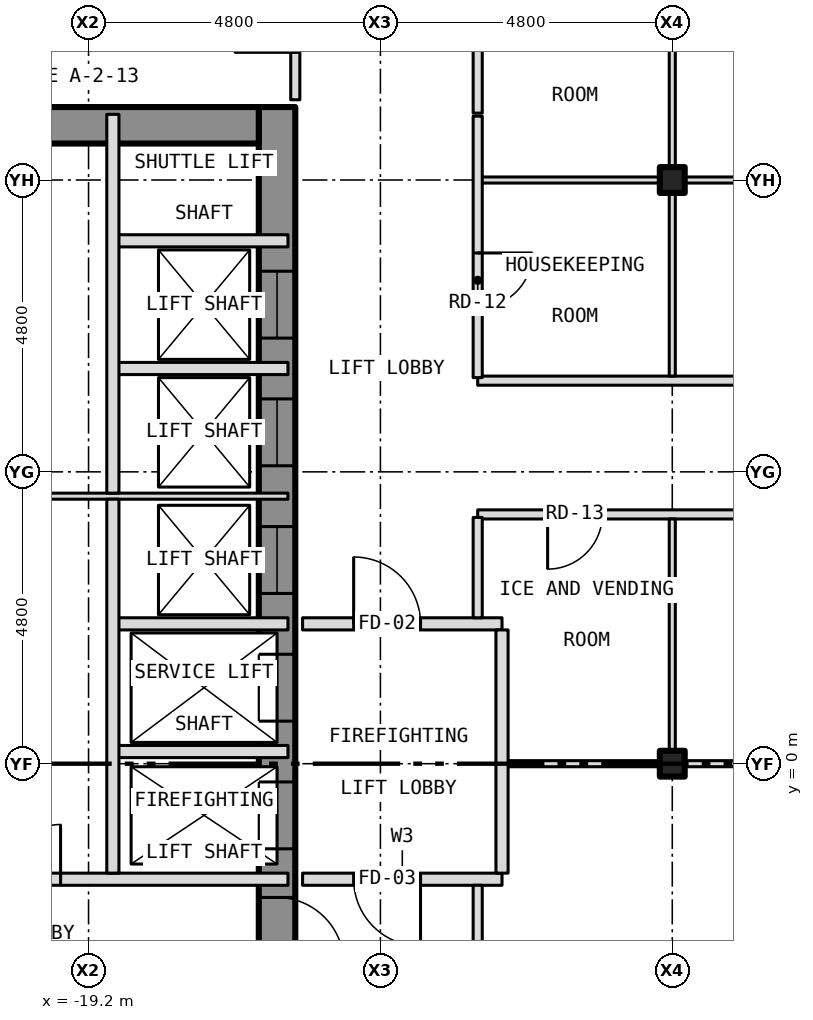
"""IFC4 building model, lengths in metres.
Left out: names, types, materials, properties, quantities, classifications, styles, units other than length and angle.
Written with IfcOpenShell. Run it as: python <this file> out.ifc"""

import sys

from ifc_helpers import new_model, si_unit, direction, frame, frame_2d, origin, origin_2d, place, context, subcontext, project, spatial, rectangle, i_section, extrude, element, fill, save


model = new_model("IFC4")
c1 = context("Model", 3, precision=1e-05, world=origin(), true_north=direction((0.0, 1.0)))
c2 = subcontext(c1, "Body", "Model", "MODEL_VIEW")
j1 = project(units=[si_unit("LENGTHUNIT", "METRE"), si_unit("PLANEANGLEUNIT", "RADIAN")], contexts=[c1])
p1 = place(None, origin())
s1 = spatial("IfcSite", under=j1, at=p1, CompositionType="ELEMENT")
p2 = place(p1, origin())
s2 = spatial("IfcBuilding", under=s1, at=p2, CompositionType="ELEMENT")
p3 = place(p2, frame((0.0, 0.0, 49.5)))
s3 = spatial("IfcBuildingStorey", under=s2, at=p3, CompositionType="ELEMENT", Elevation=49.5)
for number, where, z_axis, x_axis in (
    (1, (-9.6, 0.0, -0.15), (0.0, 0.0, 1.0), (1.0, 0.0, 0.0)),
    (2, (-9.6, 9.6, -0.15), (0.0, 0.0, 1.0), (1.0, 0.0, 0.0)),
):
    element("IfcColumn", number, at=place(p3, frame(where, z_axis=z_axis, x_axis=x_axis)), inside=s3, PredefinedType="COLUMN", context=c2, shape_type="SweptSolid", body=[
        extrude(i_section(OverallWidth=0.409, OverallDepth=0.424, WebThickness=0.033, FlangeThickness=0.052, at=origin_2d()), origin(), (0.0, 0.0, 1.0), 3.5),
    ])
p4 = place(p3, frame((-16.1, -10.8, 0.0), z_axis=(0.0, 0.0, 1.0), x_axis=(0.0, 1.0, 0.0)))
e3 = element("IfcWall", 3, at=p4, inside=s3, PredefinedType="SHEAR", context=c2, shape_type="SweptSolid", body=[
    extrude(rectangle(XDim=21.6, YDim=0.6, at=frame_2d((10.8, 0.0))), origin(), (0.0, 0.0, 1.0), 3.25),
])
p5 = place(p4, frame((9.4, 0.0, 0.0)))
e4 = element("IfcOpeningElement", 4, at=p5, cuts=e3, PredefinedType="OPENING", context=c2, shape_type="SweptSolid", body=[
    extrude(rectangle(XDim=1.1, YDim=2.1, at=frame_2d((0.55, 1.05))), frame((0.0, 0.312, 0.0), z_axis=(0.0, -1.0, 0.0), x_axis=(1.0, 0.0, 0.0)), (0.0, 0.0, 1.0), 0.624),
])
p6 = place(p4, frame((11.5, 0.0, 0.0)))
e5 = element("IfcOpeningElement", 5, at=p6, cuts=e3, PredefinedType="OPENING", context=c2, shape_type="SweptSolid", body=[
    extrude(rectangle(XDim=1.1, YDim=2.1, at=frame_2d((0.55, 1.05))), frame((0.0, 0.312, 0.0), z_axis=(0.0, -1.0, 0.0), x_axis=(1.0, 0.0, 0.0)), (0.0, 0.0, 1.0), 0.624),
])
p7 = place(p4, frame((13.6, 0.0, 0.0)))
e6 = element("IfcOpeningElement", 6, at=p7, cuts=e3, PredefinedType="OPENING", context=c2, shape_type="SweptSolid", body=[
    extrude(rectangle(XDim=1.1, YDim=2.1, at=frame_2d((0.55, 1.05))), frame((0.0, 0.312, 0.0), z_axis=(0.0, -1.0, 0.0), x_axis=(1.0, 0.0, 0.0)), (0.0, 0.0, 1.0), 0.624),
])
p8 = place(p4, frame((15.7, 0.0, 0.0)))
e7 = element("IfcOpeningElement", 7, at=p8, cuts=e3, PredefinedType="OPENING", context=c2, shape_type="SweptSolid", body=[
    extrude(rectangle(XDim=1.1, YDim=2.1, at=frame_2d((0.55, 1.05))), frame((0.0, 0.312, 0.0), z_axis=(0.0, -1.0, 0.0), x_axis=(1.0, 0.0, 0.0)), (0.0, 0.0, 1.0), 0.624),
])
p9 = place(p4, frame((17.8, 0.0, 0.0)))
e8 = element("IfcOpeningElement", 8, at=p9, cuts=e3, PredefinedType="OPENING", context=c2, shape_type="SweptSolid", body=[
    extrude(rectangle(XDim=1.1, YDim=2.1, at=frame_2d((0.55, 1.05))), frame((0.0, 0.312, 0.0), z_axis=(0.0, -1.0, 0.0), x_axis=(1.0, 0.0, 0.0)), (0.0, 0.0, 1.0), 0.624),
])
p10 = place(p4, frame((0.758, 0.0, 0.0)))
e9 = element("IfcOpeningElement", 9, at=p10, cuts=e3, PredefinedType="OPENING", context=c2, shape_type="SweptSolid", body=[
    extrude(rectangle(XDim=1.1, YDim=2.1, at=frame_2d((0.55, 1.05))), frame((0.0, 0.312, 0.0), z_axis=(0.0, -1.0, 0.0), x_axis=(1.0, 0.0, 0.0)), (0.0, 0.0, 1.0), 0.624),
])
p11 = place(p4, frame((7.5, 0.0, 0.0)))
e10 = element("IfcOpeningElement", 10, at=p11, cuts=e3, PredefinedType="OPENING", context=c2, shape_type="SweptSolid", body=[
    extrude(rectangle(XDim=1.1, YDim=2.1, at=frame_2d((0.55, 1.05))), frame((0.0, 0.312, 0.0), z_axis=(0.0, -1.0, 0.0), x_axis=(1.0, 0.0, 0.0)), (0.0, 0.0, 1.0), 0.624),
])
p12 = place(p3, frame((-23.4, 10.5, 0.0), z_axis=(0.0, 0.0, 1.0), x_axis=(1.0, 0.0, 0.0)))
e11 = element("IfcWall", 11, at=p12, inside=s3, PredefinedType="SHEAR", context=c2, shape_type="SweptSolid", body=[
    extrude(rectangle(XDim=7.0, YDim=0.6, at=frame_2d((3.5, 0.0))), origin(), (0.0, 0.0, 1.0), 3.25),
])
p13 = place(p3, frame((-23.88, -1.9, 0.0), z_axis=(0.0, 0.0, 1.0), x_axis=(1.0, 0.0, 0.0)))
e12 = element("IfcWall", 12, at=p13, inside=s3, PredefinedType="PARTITIONING", context=c2, shape_type="SweptSolid", body=[
    extrude(rectangle(XDim=7.96, YDim=0.2, at=frame_2d((3.98, 0.0))), origin(), (0.0, 0.0, 1.0), 3.25),
])
p14 = place(p13, frame((3.32, 0.0, 0.0)))
e13 = element("IfcOpeningElement", 13, at=p14, cuts=e12, PredefinedType="OPENING", context=c2, shape_type="SweptSolid", body=[
    extrude(rectangle(XDim=0.9, YDim=2.1, at=frame_2d((0.45, 1.05))), frame((0.0, 0.112, 0.0), z_axis=(0.0, -1.0, 0.0), x_axis=(1.0, 0.0, 0.0)), (0.0, 0.0, 1.0), 0.224),
])
p15 = place(p3, frame((-15.68, -1.9, 0.0), z_axis=(0.0, 0.0, 1.0), x_axis=(1.0, 0.0, 0.0)))
e14 = element("IfcWall", 14, at=p15, inside=s3, PredefinedType="PARTITIONING", context=c2, shape_type="SweptSolid", body=[
    extrude(rectangle(XDim=3.28, YDim=0.2, at=frame_2d((1.64, 0.0))), origin(), (0.0, 0.0, 1.0), 3.35),
])
p16 = place(p15, frame((0.84, 0.0, 0.0)))
e15 = element("IfcOpeningElement", 15, at=p16, cuts=e14, PredefinedType="OPENING", context=c2, shape_type="SweptSolid", body=[
    extrude(rectangle(XDim=1.1, YDim=2.1, at=frame_2d((0.55, 1.05))), frame((0.0, 0.112, 0.0), z_axis=(0.0, -1.0, 0.0), x_axis=(1.0, 0.0, 0.0)), (0.0, 0.0, 1.0), 0.224),
])
p17 = place(p3, frame((-12.4, 0.0, 0.0), z_axis=(0.0, 0.0, 1.0), x_axis=(1.0, 0.0, 0.0)))
e16 = element("IfcWall", 16, at=p17, inside=s3, PredefinedType="PARTITIONING", context=c2, shape_type="SweptSolid", body=[
    extrude(rectangle(XDim=2.596, YDim=0.1, at=frame_2d((1.298, 0.0))), origin(), (0.0, 0.0, 1.0), 2.728),
])
p18 = place(p3, frame((-9.804, 0.0, 0.0), z_axis=(0.0, 0.0, 1.0), x_axis=(1.0, 0.0, 0.0)))
e17 = element("IfcWall", 17, at=p18, inside=s3, PredefinedType="PARTITIONING", context=c2, shape_type="SweptSolid", body=[
    extrude(rectangle(XDim=0.408, YDim=0.1, at=frame_2d((0.204, 0.0))), origin(), (0.0, 0.0, 1.0), 3.35),
])
p19 = place(p3, frame((-9.396, 0.0, 0.0), z_axis=(0.0, 0.0, 1.0), x_axis=(1.0, 0.0, 0.0)))
e18 = element("IfcWall", 18, at=p19, inside=s3, PredefinedType="PARTITIONING", context=c2, shape_type="SweptSolid", body=[
    extrude(rectangle(XDim=9.192, YDim=0.1, at=frame_2d((4.596, 0.0))), origin(), (0.0, 0.0, 1.0), 2.728),
])
for number, where, z_axis, x_axis in (
    (19, (-18.8, 0.2, 0.0), (0.0, 0.0, 1.0), (1.0, 0.0, 0.0)),
    (20, (-18.8, 2.3, 0.0), (0.0, 0.0, 1.0), (1.0, 0.0, 0.0)),
):
    element("IfcWall", number, at=place(p3, frame(where, z_axis=z_axis, x_axis=x_axis)), inside=s3, PredefinedType="PARTITIONING", context=c2, shape_type="SweptSolid", body=[
        extrude(rectangle(XDim=2.88, YDim=0.2, at=frame_2d((1.44, 0.0))), origin(), (0.0, 0.0, 1.0), 3.25),
    ])
p20 = place(p3, frame((-15.68, 2.3, 0.0), z_axis=(0.0, 0.0, 1.0), x_axis=(1.0, 0.0, 0.0)))
e21 = element("IfcWall", 21, at=p20, inside=s3, PredefinedType="PARTITIONING", context=c2, shape_type="SweptSolid", body=[
    extrude(rectangle(XDim=3.28, YDim=0.2, at=frame_2d((1.64, 0.0))), origin(), (0.0, 0.0, 1.0), 3.35),
])
p21 = place(p20, frame((0.84, 0.0, 0.0)))
e22 = element("IfcOpeningElement", 22, at=p21, cuts=e21, PredefinedType="OPENING", context=c2, shape_type="SweptSolid", body=[
    extrude(rectangle(XDim=1.1, YDim=2.1, at=frame_2d((0.55, 1.05))), frame((0.0, 0.112, 0.0), z_axis=(0.0, -1.0, 0.0), x_axis=(1.0, 0.0, 0.0)), (0.0, 0.0, 1.0), 0.224),
])
p22 = place(p3, frame((-12.8, 4.1, 0.0), z_axis=(0.0, 0.0, 1.0), x_axis=(1.0, 0.0, 0.0)))
e23 = element("IfcWall", 23, at=p22, inside=s3, PredefinedType="PARTITIONING", context=c2, shape_type="SweptSolid", body=[
    extrude(rectangle(XDim=16.9, YDim=0.15, at=frame_2d((8.45, 0.0))), origin(), (0.0, 0.0, 1.0), 3.35),
])
p23 = place(p22, frame((1.15, 0.0, 0.0)))
e24 = element("IfcOpeningElement", 24, at=p23, cuts=e23, PredefinedType="OPENING", context=c2, shape_type="SweptSolid", body=[
    extrude(rectangle(XDim=0.9, YDim=2.1, at=frame_2d((0.45, 1.05))), frame((0.0, 0.087, 0.0), z_axis=(0.0, -1.0, 0.0), x_axis=(1.0, 0.0, 0.0)), (0.0, 0.0, 1.0), 0.174),
])
p24 = place(p22, frame((14.4, 0.0, 0.0)))
e25 = element("IfcOpeningElement", 25, at=p24, cuts=e23, PredefinedType="OPENING", context=c2, shape_type="SweptSolid", body=[
    extrude(rectangle(XDim=0.9, YDim=2.1, at=frame_2d((0.45, 1.05))), frame((0.0, 0.087, 0.0), z_axis=(0.0, -1.0, 0.0), x_axis=(1.0, 0.0, 0.0)), (0.0, 0.0, 1.0), 0.174),
])
p25 = place(p22, frame((7.55, 0.0, 0.0)))
e26 = element("IfcOpeningElement", 26, at=p25, cuts=e23, PredefinedType="OPENING", context=c2, shape_type="SweptSolid", body=[
    extrude(rectangle(XDim=0.9, YDim=2.1, at=frame_2d((0.45, 1.05))), frame((0.0, 0.087, 0.0), z_axis=(0.0, -1.0, 0.0), x_axis=(1.0, 0.0, 0.0)), (0.0, 0.0, 1.0), 0.174),
])
p26 = place(p3, frame((-23.88, 4.4, 0.0), z_axis=(0.0, 0.0, 1.0), x_axis=(1.0, 0.0, 0.0)))
e27 = element("IfcWall", 27, at=p26, inside=s3, PredefinedType="PARTITIONING", context=c2, shape_type="SweptSolid", body=[
    extrude(rectangle(XDim=7.96, YDim=0.1, at=frame_2d((3.98, 0.0))), origin(), (0.0, 0.0, 1.0), 3.25),
])
p27 = place(p26, frame((2.03, 0.0, 0.0)))
e28 = element("IfcOpeningElement", 28, at=p27, cuts=e27, PredefinedType="OPENING", context=c2, shape_type="SweptSolid", body=[
    extrude(rectangle(XDim=0.9, YDim=2.1, at=frame_2d((0.45, 1.05))), frame((0.0, 0.062, 0.0), z_axis=(0.0, -1.0, 0.0), x_axis=(1.0, 0.0, 0.0)), (0.0, 0.0, 1.0), 0.124),
])
p28 = place(p3, frame((-12.8, 6.3, 0.0), z_axis=(0.0, 0.0, 1.0), x_axis=(1.0, 0.0, 0.0)))
e29 = element("IfcWall", 29, at=p28, inside=s3, PredefinedType="PARTITIONING", context=c2, shape_type="SweptSolid", body=[
    extrude(rectangle(XDim=16.9, YDim=0.15, at=frame_2d((8.45, 0.0))), origin(), (0.0, 0.0, 1.0), 3.35),
])
p29 = place(p28, frame((14.4, 0.0, 0.0)))
e30 = element("IfcOpeningElement", 30, at=p29, cuts=e29, PredefinedType="OPENING", context=c2, shape_type="SweptSolid", body=[
    extrude(rectangle(XDim=0.9, YDim=2.1, at=frame_2d((0.45, 1.05))), frame((0.0, 0.087, 0.0), z_axis=(0.0, -1.0, 0.0), x_axis=(1.0, 0.0, 0.0)), (0.0, 0.0, 1.0), 0.174),
])
p30 = place(p28, frame((7.55, 0.0, 0.0)))
e31 = element("IfcOpeningElement", 31, at=p30, cuts=e29, PredefinedType="OPENING", context=c2, shape_type="SweptSolid", body=[
    extrude(rectangle(XDim=0.9, YDim=2.1, at=frame_2d((0.45, 1.05))), frame((0.0, 0.087, 0.0), z_axis=(0.0, -1.0, 0.0), x_axis=(1.0, 0.0, 0.0)), (0.0, 0.0, 1.0), 0.174),
])
for number, where, z_axis, x_axis in (
    (32, (-18.8, 6.5, 0.0), (0.0, 0.0, 1.0), (1.0, 0.0, 0.0)),
    (33, (-18.8, 8.6, 0.0), (0.0, 0.0, 1.0), (1.0, 0.0, 0.0)),
):
    element("IfcWall", number, at=place(p3, frame(where, z_axis=z_axis, x_axis=x_axis)), inside=s3, PredefinedType="PARTITIONING", context=c2, shape_type="SweptSolid", body=[
        extrude(rectangle(XDim=2.88, YDim=0.2, at=frame_2d((1.44, 0.0))), origin(), (0.0, 0.0, 1.0), 3.25),
    ])
p31 = place(p3, frame((-12.8, 9.6, 0.0), z_axis=(0.0, 0.0, 1.0), x_axis=(1.0, 0.0, 0.0)))
e34 = element("IfcWall", 34, at=p31, inside=s3, PredefinedType="PARTITIONING", context=c2, shape_type="SweptSolid", body=[
    extrude(rectangle(XDim=2.996, YDim=0.1, at=frame_2d((1.498, 0.0))), origin(), (0.0, 0.0, 1.0), 2.728),
])
p32 = place(p3, frame((-9.804, 9.6, 0.0), z_axis=(0.0, 0.0, 1.0), x_axis=(1.0, 0.0, 0.0)))
e35 = element("IfcWall", 35, at=p32, inside=s3, PredefinedType="PARTITIONING", context=c2, shape_type="SweptSolid", body=[
    extrude(rectangle(XDim=0.408, YDim=0.1, at=frame_2d((0.204, 0.0))), origin(), (0.0, 0.0, 1.0), 3.35),
])
p33 = place(p3, frame((-9.396, 9.6, 0.0), z_axis=(0.0, 0.0, 1.0), x_axis=(1.0, 0.0, 0.0)))
e36 = element("IfcWall", 36, at=p33, inside=s3, PredefinedType="PARTITIONING", context=c2, shape_type="SweptSolid", body=[
    extrude(rectangle(XDim=9.192, YDim=0.1, at=frame_2d((4.596, 0.0))), origin(), (0.0, 0.0, 1.0), 2.728),
])
p34 = place(p3, frame((-18.8, -1.8, 0.0), z_axis=(0.0, 0.0, 1.0), x_axis=(0.0, 1.0, 0.0)))
e37 = element("IfcWall", 37, at=p34, inside=s3, PredefinedType="PARTITIONING", context=c2, shape_type="SweptSolid", body=[
    extrude(rectangle(XDim=6.15, YDim=0.2, at=frame_2d((3.075, 0.0))), origin(), (0.0, 0.0, 1.0), 3.25),
])
p35 = place(p3, frame((-18.8, 4.45, 0.0), z_axis=(0.0, 0.0, 1.0), x_axis=(0.0, 1.0, 0.0)))
e38 = element("IfcWall", 38, at=p35, inside=s3, PredefinedType="PARTITIONING", context=c2, shape_type="SweptSolid", body=[
    extrude(rectangle(XDim=6.23, YDim=0.2, at=frame_2d((3.115, 0.0))), origin(), (0.0, 0.0, 1.0), 3.25),
])
p36 = place(p3, frame((-15.8, 10.92, 0.0), z_axis=(0.0, 0.0, 1.0), x_axis=(0.0, 1.0, 0.0)))
e39 = element("IfcWall", 39, at=p36, inside=s3, PredefinedType="PARTITIONING", context=c2, shape_type="SweptSolid", body=[
    extrude(rectangle(XDim=4.805, YDim=0.15, at=frame_2d((2.403, 0.0))), origin(), (0.0, 0.0, 1.0), 3.35),
])
p37 = place(p36, frame((0.78, 0.0, 0.0)))
e40 = element("IfcOpeningElement", 40, at=p37, cuts=e39, PredefinedType="OPENING", context=c2, shape_type="SweptSolid", body=[
    extrude(rectangle(XDim=1.0, YDim=2.1, at=frame_2d((0.5, 1.05))), frame((0.0, 0.087, 0.0), z_axis=(0.0, -1.0, 0.0), x_axis=(1.0, 0.0, 0.0)), (0.0, 0.0, 1.0), 0.174),
])
p38 = place(p3, frame((-12.8, -13.525, 0.0), z_axis=(0.0, 0.0, 1.0), x_axis=(0.0, 1.0, 0.0)))
e41 = element("IfcWall", 41, at=p38, inside=s3, PredefinedType="PARTITIONING", context=c2, shape_type="SweptSolid", body=[
    extrude(rectangle(XDim=11.525, YDim=0.15, at=frame_2d((5.762, 0.0))), origin(), (0.0, 0.0, 1.0), 3.35),
])
p39 = place(p38, frame((7.325, 0.0, 0.0)))
e42 = element("IfcOpeningElement", 42, at=p39, cuts=e41, PredefinedType="OPENING", context=c2, shape_type="SweptSolid", body=[
    extrude(rectangle(XDim=0.9, YDim=2.1, at=frame_2d((0.45, 1.05))), frame((0.0, 0.087, 0.0), z_axis=(0.0, -1.0, 0.0), x_axis=(1.0, 0.0, 0.0)), (0.0, 0.0, 1.0), 0.174),
])
p40 = place(p3, frame((-12.8, 2.4, 0.0), z_axis=(0.0, 0.0, 1.0), x_axis=(0.0, 1.0, 0.0)))
e43 = element("IfcWall", 43, at=p40, inside=s3, PredefinedType="PARTITIONING", context=c2, shape_type="SweptSolid", body=[
    extrude(rectangle(XDim=1.65, YDim=0.15, at=frame_2d((0.825, 0.0))), origin(), (0.0, 0.0, 1.0), 3.35),
])
p41 = place(p3, frame((-12.8, 6.35, 0.0), z_axis=(0.0, 0.0, 1.0), x_axis=(0.0, 1.0, 0.0)))
e44 = element("IfcWall", 44, at=p41, inside=s3, PredefinedType="PARTITIONING", context=c2, shape_type="SweptSolid", body=[
    extrude(rectangle(XDim=4.3, YDim=0.15, at=frame_2d((2.15, 0.0))), origin(), (0.0, 0.0, 1.0), 3.35),
])
p42 = place(p41, frame((1.15, 0.0, 0.0)))
e45 = element("IfcOpeningElement", 45, at=p42, cuts=e44, PredefinedType="OPENING", context=c2, shape_type="SweptSolid", body=[
    extrude(rectangle(XDim=0.9, YDim=2.1, at=frame_2d((0.45, 1.05))), frame((0.0, 0.087, 0.0), z_axis=(0.0, -1.0, 0.0), x_axis=(1.0, 0.0, 0.0)), (0.0, 0.0, 1.0), 0.174),
])
p43 = place(p3, frame((-12.8, 10.7, 0.0), z_axis=(0.0, 0.0, 1.0), x_axis=(0.0, 1.0, 0.0)))
e46 = element("IfcWall", 46, at=p43, inside=s3, PredefinedType="PARTITIONING", context=c2, shape_type="SweptSolid", body=[
    extrude(rectangle(XDim=2.825, YDim=0.15, at=frame_2d((1.413, 0.0))), origin(), (0.0, 0.0, 1.0), 3.35),
])
p44 = place(p3, frame((-12.4, -1.8, 0.0), z_axis=(0.0, 0.0, 1.0), x_axis=(0.0, 1.0, 0.0)))
e47 = element("IfcWall", 47, at=p44, inside=s3, PredefinedType="PARTITIONING", context=c2, shape_type="SweptSolid", body=[
    extrude(rectangle(XDim=4.0, YDim=0.2, at=frame_2d((2.0, 0.0))), origin(), (0.0, 0.0, 1.0), 3.35),
])
p45 = place(p3, frame((-9.6, 0.05, 0.0), z_axis=(0.0, 0.0, 1.0), x_axis=(0.0, 1.0, 0.0)))
e48 = element("IfcWall", 48, at=p45, inside=s3, PredefinedType="PARTITIONING", context=c2, shape_type="SweptSolid", body=[
    extrude(rectangle(XDim=3.975, YDim=0.1, at=frame_2d((1.987, 0.0))), origin(), (0.0, 0.0, 1.0), 2.728),
])
p46 = place(p3, frame((-9.6, 6.375, 0.0), z_axis=(0.0, 0.0, 1.0), x_axis=(0.0, 1.0, 0.0)))
e49 = element("IfcWall", 49, at=p46, inside=s3, PredefinedType="PARTITIONING", context=c2, shape_type="SweptSolid", body=[
    extrude(rectangle(XDim=3.175, YDim=0.1, at=frame_2d((1.587, 0.0))), origin(), (0.0, 0.0, 1.0), 2.728),
])
p47 = place(p3, frame((-9.6, 9.65, 0.0), z_axis=(0.0, 0.0, 1.0), x_axis=(0.0, 1.0, 0.0)))
e50 = element("IfcWall", 50, at=p47, inside=s3, PredefinedType="PARTITIONING", context=c2, shape_type="SweptSolid", body=[
    extrude(rectangle(XDim=3.875, YDim=0.1, at=frame_2d((1.938, 0.0))), origin(), (0.0, 0.0, 1.0), 2.728),
])
p48 = place(p5, origin())
e51 = element("IfcDoor", 51, at=p48, inside=s3, OperationType="SLIDING_TO_LEFT", PredefinedType="DOOR", context=c2, shape_type="SweptSolid", body=[
    extrude(rectangle(XDim=1.1, YDim=2.1, at=frame_2d((0.55, 1.05))), frame((0.0, 0.025, 0.0), z_axis=(0.0, -1.0, 0.0), x_axis=(1.0, 0.0, 0.0)), (0.0, 0.0, 1.0), 0.05),
])
fill(e4, e51)
p49 = place(p6, origin())
e52 = element("IfcDoor", 52, at=p49, inside=s3, OperationType="SLIDING_TO_LEFT", PredefinedType="DOOR", context=c2, shape_type="SweptSolid", body=[
    extrude(rectangle(XDim=1.1, YDim=2.1, at=frame_2d((0.55, 1.05))), frame((0.0, 0.025, 0.0), z_axis=(0.0, -1.0, 0.0), x_axis=(1.0, 0.0, 0.0)), (0.0, 0.0, 1.0), 0.05),
])
fill(e5, e52)
p50 = place(p7, origin())
e53 = element("IfcDoor", 53, at=p50, inside=s3, OperationType="SLIDING_TO_LEFT", PredefinedType="DOOR", context=c2, shape_type="SweptSolid", body=[
    extrude(rectangle(XDim=1.1, YDim=2.1, at=frame_2d((0.55, 1.05))), frame((0.0, 0.025, 0.0), z_axis=(0.0, -1.0, 0.0), x_axis=(1.0, 0.0, 0.0)), (0.0, 0.0, 1.0), 0.05),
])
fill(e6, e53)
p51 = place(p8, origin())
e54 = element("IfcDoor", 54, at=p51, inside=s3, OperationType="SLIDING_TO_LEFT", PredefinedType="DOOR", context=c2, shape_type="SweptSolid", body=[
    extrude(rectangle(XDim=1.1, YDim=2.1, at=frame_2d((0.55, 1.05))), frame((0.0, 0.025, 0.0), z_axis=(0.0, -1.0, 0.0), x_axis=(1.0, 0.0, 0.0)), (0.0, 0.0, 1.0), 0.05),
])
fill(e7, e54)
p52 = place(p9, origin())
e55 = element("IfcDoor", 55, at=p52, inside=s3, OperationType="SLIDING_TO_LEFT", PredefinedType="DOOR", context=c2, shape_type="SweptSolid", body=[
    extrude(rectangle(XDim=1.1, YDim=2.1, at=frame_2d((0.55, 1.05))), frame((0.0, 0.025, 0.0), z_axis=(0.0, -1.0, 0.0), x_axis=(1.0, 0.0, 0.0)), (0.0, 0.0, 1.0), 0.05),
])
fill(e8, e55)
p53 = place(p11, origin())
e56 = element("IfcDoor", 56, at=p53, inside=s3, OperationType="SINGLE_SWING_LEFT", PredefinedType="DOOR", context=c2, shape_type="SweptSolid", body=[
    extrude(rectangle(XDim=1.1, YDim=2.1, at=frame_2d((0.55, 1.05))), frame((0.0, 0.025, 0.0), z_axis=(0.0, -1.0, 0.0), x_axis=(1.0, 0.0, 0.0)), (0.0, 0.0, 1.0), 0.05),
])
fill(e10, e56)
p54 = place(p14, origin())
e57 = element("IfcDoor", 57, at=p54, inside=s3, OperationType="SINGLE_SWING_RIGHT", PredefinedType="DOOR", context=c2, shape_type="SweptSolid", body=[
    extrude(rectangle(XDim=0.9, YDim=2.1, at=frame_2d((0.45, 1.05))), frame((0.0, 0.025, 0.0), z_axis=(0.0, -1.0, 0.0), x_axis=(1.0, 0.0, 0.0)), (0.0, 0.0, 1.0), 0.05),
])
fill(e13, e57)
p55 = place(p21, origin())
e58 = element("IfcDoor", 58, at=p55, inside=s3, OperationType="SINGLE_SWING_LEFT", PredefinedType="DOOR", context=c2, shape_type="SweptSolid", body=[
    extrude(rectangle(XDim=1.1, YDim=2.1, at=frame_2d((0.55, 1.05))), frame((0.0, 0.025, 0.0), z_axis=(0.0, -1.0, 0.0), x_axis=(1.0, 0.0, 0.0)), (0.0, 0.0, 1.0), 0.05),
])
fill(e22, e58)
p56 = place(p16, origin())
e59 = element("IfcDoor", 59, at=p56, inside=s3, OperationType="SINGLE_SWING_RIGHT", PredefinedType="DOOR", context=c2, shape_type="SweptSolid", body=[
    extrude(rectangle(XDim=1.1, YDim=2.1, at=frame_2d((0.55, 1.05))), frame((0.0, 0.025, 0.0), z_axis=(0.0, -1.0, 0.0), x_axis=(1.0, 0.0, 0.0)), (0.0, 0.0, 1.0), 0.05),
])
fill(e15, e59)
p57 = place(p42, origin())
e60 = element("IfcDoor", 60, at=p57, inside=s3, OperationType="SINGLE_SWING_RIGHT", PredefinedType="DOOR", context=c2, shape_type="SweptSolid", body=[
    extrude(rectangle(XDim=0.9, YDim=2.1, at=frame_2d((0.45, 1.05))), frame((0.0, 0.025, 0.0), z_axis=(0.0, -1.0, 0.0), x_axis=(1.0, 0.0, 0.0)), (0.0, 0.0, 1.0), 0.05),
])
fill(e45, e60)
p58 = place(p23, origin())
e61 = element("IfcDoor", 61, at=p58, inside=s3, OperationType="SINGLE_SWING_LEFT", PredefinedType="DOOR", context=c2, shape_type="SweptSolid", body=[
    extrude(rectangle(XDim=0.9, YDim=2.1, at=frame_2d((0.45, 1.05))), frame((0.0, 0.025, 0.0), z_axis=(0.0, -1.0, 0.0), x_axis=(1.0, 0.0, 0.0)), (0.0, 0.0, 1.0), 0.05),
])
fill(e24, e61)
save(model, sys.argv[1])
